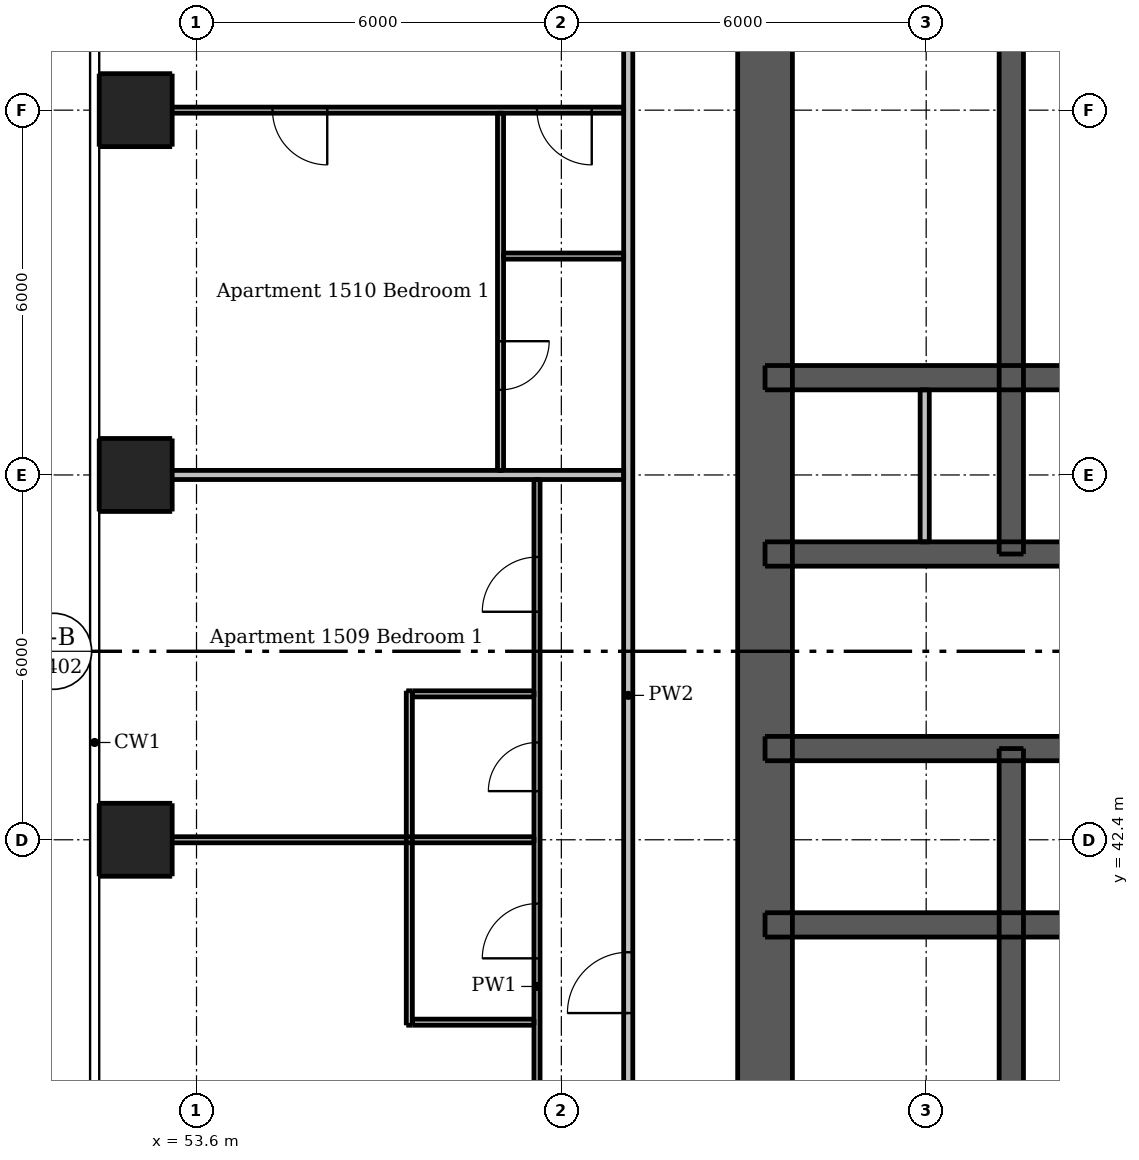
"""IFC4 building model, lengths in metres.
Left out: names, types, materials, properties, quantities, classifications, styles, units other than length and angle.
Written with IfcOpenShell. Run it as: python <this file> out.ifc"""

import sys

from ifc_helpers import new_model, si_unit, direction, frame, frame_2d, origin, origin_2d, place, context, subcontext, project, spatial, rectangle, extrude, element, fill, save


model = new_model("IFC4")
c1 = context("Model", 3, precision=1e-05, world=origin(), true_north=direction((0.0, 1.0)))
c2 = subcontext(c1, "Body", "Model", "MODEL_VIEW")
j1 = project(units=[si_unit("LENGTHUNIT", "METRE"), si_unit("PLANEANGLEUNIT", "RADIAN")], contexts=[c1])
p1 = place(None, origin())
s1 = spatial("IfcSite", under=j1, at=p1, CompositionType="ELEMENT")
p2 = place(p1, origin())
s2 = spatial("IfcBuilding", under=s1, at=p2, CompositionType="ELEMENT")
p3 = place(p2, frame((0.0, 0.0, 56.5)))
s3 = spatial("IfcBuildingStorey", under=s2, at=p3, CompositionType="ELEMENT", Elevation=56.5)
p4 = place(p3, frame((62.95, 33.5, 0.0), z_axis=(0.0, 0.0, 1.0), x_axis=(0.0, 1.0, 0.0)))
e1 = element("IfcWall", 1, at=p4, inside=s3, PredefinedType="SHEAR", context=c2, shape_type="SweptSolid", body=[
    extrude(rectangle(XDim=24.0, YDim=0.9, at=frame_2d((12.0, 0.0))), origin(), (0.0, 0.0, 1.0), 3.05),
])
p5 = place(p4, frame((11.2, 0.0, 0.0)))
e2 = element("IfcOpeningElement", 2, at=p5, cuts=e1, PredefinedType="OPENING", context=c2, shape_type="SweptSolid", body=[
    extrude(rectangle(XDim=1.6, YDim=2.1, at=frame_2d((0.8, 1.05))), frame((0.0, 0.46, 0.0), z_axis=(0.0, -1.0, 0.0), x_axis=(1.0, 0.0, 0.0)), (0.0, 0.0, 1.0), 0.92),
])
p6 = place(p3, frame((62.95, 41.0, 0.0), z_axis=(0.0, 0.0, 1.0), x_axis=(1.0, 0.0, 0.0)))
e3 = element("IfcWall", 3, at=p6, inside=s3, PredefinedType="SHEAR", context=c2, shape_type="SweptSolid", body=[
    extrude(rectangle(XDim=23.1, YDim=0.4, at=frame_2d((11.55, 0.0))), origin(), (0.0, 0.0, 1.0), 3.05),
])
p7 = place(p3, frame((62.95, 43.9, 0.0), z_axis=(0.0, 0.0, 1.0), x_axis=(1.0, 0.0, 0.0)))
e4 = element("IfcWall", 4, at=p7, inside=s3, PredefinedType="SHEAR", context=c2, shape_type="SweptSolid", body=[
    extrude(rectangle(XDim=23.1, YDim=0.4, at=frame_2d((11.55, 0.0))), origin(), (0.0, 0.0, 1.0), 3.05),
])
p8 = place(p7, frame((1.7, 0.0, 0.0)))
e5 = element("IfcOpeningElement", 5, at=p8, cuts=e4, PredefinedType="OPENING", context=c2, shape_type="SweptSolid", body=[
    extrude(rectangle(XDim=0.9, YDim=2.1, at=frame_2d((0.45, 1.05))), frame((0.0, 0.21, 0.0), z_axis=(0.0, -1.0, 0.0), x_axis=(1.0, 0.0, 0.0)), (0.0, 0.0, 1.0), 0.42),
])
p9 = place(p7, frame((20.5, 0.0, 0.0)))
e6 = element("IfcOpeningElement", 6, at=p9, cuts=e4, PredefinedType="OPENING", context=c2, shape_type="SweptSolid", body=[
    extrude(rectangle(XDim=0.9, YDim=2.1, at=frame_2d((0.45, 1.05))), frame((0.0, 0.21, 0.0), z_axis=(0.0, -1.0, 0.0), x_axis=(1.0, 0.0, 0.0)), (0.0, 0.0, 1.0), 0.42),
])
p10 = place(p7, frame((4.75, 0.0, 0.0)))
e7 = element("IfcOpeningElement", 7, at=p10, cuts=e4, PredefinedType="OPENING", context=c2, shape_type="SweptSolid", body=[
    extrude(rectangle(XDim=1.1, YDim=2.1, at=frame_2d((0.55, 1.05))), frame((0.0, 0.21, 0.0), z_axis=(0.0, -1.0, 0.0), x_axis=(1.0, 0.0, 0.0)), (0.0, 0.0, 1.0), 0.42),
])
p11 = place(p7, frame((7.25, 0.0, 0.0)))
e8 = element("IfcOpeningElement", 8, at=p11, cuts=e4, PredefinedType="OPENING", context=c2, shape_type="SweptSolid", body=[
    extrude(rectangle(XDim=1.1, YDim=2.1, at=frame_2d((0.55, 1.05))), frame((0.0, 0.21, 0.0), z_axis=(0.0, -1.0, 0.0), x_axis=(1.0, 0.0, 0.0)), (0.0, 0.0, 1.0), 0.42),
])
p12 = place(p7, frame((9.75, 0.0, 0.0)))
e9 = element("IfcOpeningElement", 9, at=p12, cuts=e4, PredefinedType="OPENING", context=c2, shape_type="SweptSolid", body=[
    extrude(rectangle(XDim=1.1, YDim=2.1, at=frame_2d((0.55, 1.05))), frame((0.0, 0.21, 0.0), z_axis=(0.0, -1.0, 0.0), x_axis=(1.0, 0.0, 0.0)), (0.0, 0.0, 1.0), 0.42),
])
p13 = place(p7, frame((12.25, 0.0, 0.0)))
e10 = element("IfcOpeningElement", 10, at=p13, cuts=e4, PredefinedType="OPENING", context=c2, shape_type="SweptSolid", body=[
    extrude(rectangle(XDim=1.1, YDim=2.1, at=frame_2d((0.55, 1.05))), frame((0.0, 0.21, 0.0), z_axis=(0.0, -1.0, 0.0), x_axis=(1.0, 0.0, 0.0)), (0.0, 0.0, 1.0), 0.42),
])
p14 = place(p7, frame((14.75, 0.0, 0.0)))
e11 = element("IfcOpeningElement", 11, at=p14, cuts=e4, PredefinedType="OPENING", context=c2, shape_type="SweptSolid", body=[
    extrude(rectangle(XDim=1.1, YDim=2.1, at=frame_2d((0.55, 1.05))), frame((0.0, 0.21, 0.0), z_axis=(0.0, -1.0, 0.0), x_axis=(1.0, 0.0, 0.0)), (0.0, 0.0, 1.0), 0.42),
])
p15 = place(p7, frame((17.25, 0.0, 0.0)))
e12 = element("IfcOpeningElement", 12, at=p15, cuts=e4, PredefinedType="OPENING", context=c2, shape_type="SweptSolid", body=[
    extrude(rectangle(XDim=1.1, YDim=2.1, at=frame_2d((0.55, 1.05))), frame((0.0, 0.21, 0.0), z_axis=(0.0, -1.0, 0.0), x_axis=(1.0, 0.0, 0.0)), (0.0, 0.0, 1.0), 0.42),
])
p16 = place(p3, frame((62.95, 47.1, 0.0), z_axis=(0.0, 0.0, 1.0), x_axis=(1.0, 0.0, 0.0)))
e13 = element("IfcWall", 13, at=p16, inside=s3, PredefinedType="SHEAR", context=c2, shape_type="SweptSolid", body=[
    extrude(rectangle(XDim=23.1, YDim=0.4, at=frame_2d((11.55, 0.0))), origin(), (0.0, 0.0, 1.0), 3.05),
])
p17 = place(p16, frame((1.088, 0.0, 0.0)))
e14 = element("IfcOpeningElement", 14, at=p17, cuts=e13, PredefinedType="OPENING", context=c2, shape_type="SweptSolid", body=[
    extrude(rectangle(XDim=0.9, YDim=2.1, at=frame_2d((0.45, 1.05))), frame((0.0, 0.21, 0.0), z_axis=(0.0, -1.0, 0.0), x_axis=(1.0, 0.0, 0.0)), (0.0, 0.0, 1.0), 0.42),
])
p18 = place(p16, frame((2.838, 0.0, 0.0)))
e15 = element("IfcOpeningElement", 15, at=p18, cuts=e13, PredefinedType="OPENING", context=c2, shape_type="SweptSolid", body=[
    extrude(rectangle(XDim=0.8, YDim=2.1, at=frame_2d((0.4, 1.05))), frame((0.0, 0.21, 0.0), z_axis=(0.0, -1.0, 0.0), x_axis=(1.0, 0.0, 0.0)), (0.0, 0.0, 1.0), 0.42),
])
p19 = place(p16, frame((20.5, 0.0, 0.0)))
e16 = element("IfcOpeningElement", 16, at=p19, cuts=e13, PredefinedType="OPENING", context=c2, shape_type="SweptSolid", body=[
    extrude(rectangle(XDim=0.9, YDim=2.1, at=frame_2d((0.45, 1.05))), frame((0.0, 0.21, 0.0), z_axis=(0.0, -1.0, 0.0), x_axis=(1.0, 0.0, 0.0)), (0.0, 0.0, 1.0), 0.42),
])
p20 = place(p3, frame((62.95, 50.0, 0.0), z_axis=(0.0, 0.0, 1.0), x_axis=(1.0, 0.0, 0.0)))
e17 = element("IfcWall", 17, at=p20, inside=s3, PredefinedType="SHEAR", context=c2, shape_type="SweptSolid", body=[
    extrude(rectangle(XDim=23.1, YDim=0.4, at=frame_2d((11.55, 0.0))), origin(), (0.0, 0.0, 1.0), 3.05),
])
p21 = place(p3, frame((67.0, 33.95, 0.0), z_axis=(0.0, 0.0, 1.0), x_axis=(0.0, 1.0, 0.0)))
e18 = element("IfcWall", 18, at=p21, inside=s3, PredefinedType="SHEAR", context=c2, shape_type="SweptSolid", body=[
    extrude(rectangle(XDim=9.95, YDim=0.4, at=frame_2d((4.975, 0.0))), origin(), (0.0, 0.0, 1.0), 3.05),
])
p22 = place(p21, frame((0.65, 0.0, 0.0)))
e19 = element("IfcOpeningElement", 19, at=p22, cuts=e18, PredefinedType="OPENING", context=c2, shape_type="SweptSolid", body=[
    extrude(rectangle(XDim=1.1, YDim=2.1, at=frame_2d((0.55, 1.05))), frame((0.0, 0.21, 0.0), z_axis=(0.0, -1.0, 0.0), x_axis=(1.0, 0.0, 0.0)), (0.0, 0.0, 1.0), 0.42),
])
p23 = place(p3, frame((67.0, 47.1, 0.0), z_axis=(0.0, 0.0, 1.0), x_axis=(0.0, 1.0, 0.0)))
e20 = element("IfcWall", 20, at=p23, inside=s3, PredefinedType="SHEAR", context=c2, shape_type="SweptSolid", body=[
    extrude(rectangle(XDim=9.95, YDim=0.4, at=frame_2d((4.975, 0.0))), origin(), (0.0, 0.0, 1.0), 3.05),
])
for number, where, z_axis, x_axis in (
    (21, (52.6, 42.4, 0.0), (0.0, 0.0, 1.0), (1.0, 0.0, 0.0)),
    (22, (52.6, 48.4, 0.0), (0.0, 0.0, 1.0), (1.0, 0.0, 0.0)),
    (23, (52.6, 54.4, 0.0), (0.0, 0.0, 1.0), (1.0, 0.0, 0.0)),
):
    element("IfcColumn", number, at=place(p3, frame(where, z_axis=z_axis, x_axis=x_axis)), inside=s3, PredefinedType="COLUMN", context=c2, shape_type="SweptSolid", body=[
        extrude(rectangle(XDim=1.2, YDim=1.2, at=origin_2d()), origin(), (0.0, 0.0, 1.0), 3.05),
    ])
p24 = place(p3, frame((65.576, 47.3, 0.0), z_axis=(0.0, 0.0, 1.0), x_axis=(0.0, 1.0, 0.0)))
e24 = element("IfcWall", 24, at=p24, inside=s3, PredefinedType="PLUMBINGWALL", context=c2, shape_type="SweptSolid", body=[
    extrude(rectangle(XDim=2.5, YDim=0.15, at=frame_2d((1.25, 0.0))), origin(), (0.0, 0.0, 1.0), 3.05),
])
p25 = place(p3, frame((57.1, 39.35, 0.0), z_axis=(0.0, 0.0, 1.0), x_axis=(0.0, 1.0, 0.0)))
e25 = element("IfcWall", 25, at=p25, inside=s3, PredefinedType="PARTITIONING", context=c2, shape_type="SweptSolid", body=[
    extrude(rectangle(XDim=5.5, YDim=0.1, at=frame_2d((2.75, 0.0))), origin(), (0.0, 0.0, 1.0), 3.05),
])
p26 = place(p3, frame((58.6, 54.35, 0.0), z_axis=(0.0, 0.0, 1.0), x_axis=(0.0, -1.0, 0.0)))
e26 = element("IfcWall", 26, at=p26, inside=s3, PredefinedType="PARTITIONING", context=c2, shape_type="SweptSolid", body=[
    extrude(rectangle(XDim=5.875, YDim=0.1, at=frame_2d((2.938, 0.0))), origin(), (0.0, 0.0, 1.0), 3.05),
])
p27 = place(p26, frame((3.75, 0.0, 0.0)))
e27 = element("IfcOpeningElement", 27, at=p27, cuts=e26, PredefinedType="OPENING", context=c2, shape_type="SweptSolid", body=[
    extrude(rectangle(XDim=0.8, YDim=2.1, at=frame_2d((0.4, 1.05))), frame((0.0, 0.06, 0.0), z_axis=(0.0, -1.0, 0.0), x_axis=(1.0, 0.0, 0.0)), (0.0, 0.0, 1.0), 0.12),
])
p28 = place(p3, frame((59.2, 31.65, 0.0), z_axis=(0.0, 0.0, 1.0), x_axis=(0.0, 1.0, 0.0)))
e28 = element("IfcWall", 28, at=p28, inside=s3, PredefinedType="PARTITIONING", context=c2, shape_type="SweptSolid", body=[
    extrude(rectangle(XDim=16.675, YDim=0.1, at=frame_2d((8.337, 0.0))), origin(), (0.0, 0.0, 1.0), 3.05),
])
p29 = place(p28, frame((3.45, 0.0, 0.0)))
e29 = element("IfcOpeningElement", 29, at=p29, cuts=e28, PredefinedType="OPENING", context=c2, shape_type="SweptSolid", body=[
    extrude(rectangle(XDim=0.9, YDim=2.1, at=frame_2d((0.45, 1.05))), frame((0.0, 0.06, 0.0), z_axis=(0.0, -1.0, 0.0), x_axis=(1.0, 0.0, 0.0)), (0.0, 0.0, 1.0), 0.12),
])
p30 = place(p28, frame((8.8, 0.0, 0.0)))
e30 = element("IfcOpeningElement", 30, at=p30, cuts=e28, PredefinedType="OPENING", context=c2, shape_type="SweptSolid", body=[
    extrude(rectangle(XDim=0.9, YDim=2.1, at=frame_2d((0.45, 1.05))), frame((0.0, 0.06, 0.0), z_axis=(0.0, -1.0, 0.0), x_axis=(1.0, 0.0, 0.0)), (0.0, 0.0, 1.0), 0.12),
])
p31 = place(p28, frame((14.5, 0.0, 0.0)))
e31 = element("IfcOpeningElement", 31, at=p31, cuts=e28, PredefinedType="OPENING", context=c2, shape_type="SweptSolid", body=[
    extrude(rectangle(XDim=0.9, YDim=2.1, at=frame_2d((0.45, 1.05))), frame((0.0, 0.06, 0.0), z_axis=(0.0, -1.0, 0.0), x_axis=(1.0, 0.0, 0.0)), (0.0, 0.0, 1.0), 0.12),
])
p32 = place(p28, frame((11.55, 0.0, 0.0)))
e32 = element("IfcOpeningElement", 32, at=p32, cuts=e28, PredefinedType="OPENING", context=c2, shape_type="SweptSolid", body=[
    extrude(rectangle(XDim=0.8, YDim=2.1, at=frame_2d((0.4, 1.05))), frame((0.0, 0.06, 0.0), z_axis=(0.0, -1.0, 0.0), x_axis=(1.0, 0.0, 0.0)), (0.0, 0.0, 1.0), 0.12),
])
p33 = place(p3, frame((60.625, 54.4, 0.0), z_axis=(0.0, 0.0, 1.0), x_axis=(-1.0, 0.0, 0.0)))
e33 = element("IfcWall", 33, at=p33, inside=s3, PredefinedType="PARTITIONING", context=c2, shape_type="SweptSolid", body=[
    extrude(rectangle(XDim=8.625, YDim=0.1, at=frame_2d((4.312, 0.0))), origin(), (0.0, 0.0, 1.0), 2.516),
])
p34 = place(p33, frame((0.525, 0.0, 0.0)))
e34 = element("IfcOpeningElement", 34, at=p34, cuts=e33, PredefinedType="OPENING", context=c2, shape_type="SweptSolid", body=[
    extrude(rectangle(XDim=0.9, YDim=2.1, at=frame_2d((0.45, 1.05))), frame((0.0, 0.06, 0.0), z_axis=(0.0, -1.0, 0.0), x_axis=(1.0, 0.0, 0.0)), (0.0, 0.0, 1.0), 0.12),
])
p35 = place(p33, frame((4.875, 0.0, 0.0)))
e35 = element("IfcOpeningElement", 35, at=p35, cuts=e33, PredefinedType="OPENING", context=c2, shape_type="SweptSolid", body=[
    extrude(rectangle(XDim=0.9, YDim=2.1, at=frame_2d((0.45, 1.05))), frame((0.0, 0.06, 0.0), z_axis=(0.0, -1.0, 0.0), x_axis=(1.0, 0.0, 0.0)), (0.0, 0.0, 1.0), 0.12),
])
p36 = place(p3, frame((58.65, 52.0, 0.0), z_axis=(0.0, 0.0, 1.0), x_axis=(1.0, 0.0, 0.0)))
e36 = element("IfcWall", 36, at=p36, inside=s3, PredefinedType="PARTITIONING", context=c2, shape_type="SweptSolid", body=[
    extrude(rectangle(XDim=1.975, YDim=0.1, at=frame_2d((0.988, 0.0))), origin(), (0.0, 0.0, 1.0), 3.05),
])
p37 = place(p3, frame((57.15, 44.8, 0.0), z_axis=(0.0, 0.0, 1.0), x_axis=(1.0, 0.0, 0.0)))
e37 = element("IfcWall", 37, at=p37, inside=s3, PredefinedType="PARTITIONING", context=c2, shape_type="SweptSolid", body=[
    extrude(rectangle(XDim=2.0, YDim=0.1, at=frame_2d((1.0, 0.0))), origin(), (0.0, 0.0, 1.0), 3.05),
])
p38 = place(p3, frame((52.0, 42.4, 0.0), z_axis=(0.0, 0.0, 1.0), x_axis=(1.0, 0.0, 0.0)))
e38 = element("IfcWall", 38, at=p38, inside=s3, PredefinedType="PARTITIONING", context=c2, shape_type="SweptSolid", body=[
    extrude(rectangle(XDim=7.15, YDim=0.1, at=frame_2d((3.575, 0.0))), origin(), (0.0, 0.0, 1.0), 2.516),
])
p39 = place(p3, frame((57.15, 39.4, 0.0), z_axis=(0.0, 0.0, 1.0), x_axis=(1.0, 0.0, 0.0)))
e39 = element("IfcWall", 39, at=p39, inside=s3, PredefinedType="PARTITIONING", context=c2, shape_type="SweptSolid", body=[
    extrude(rectangle(XDim=2.0, YDim=0.1, at=frame_2d((1.0, 0.0))), origin(), (0.0, 0.0, 1.0), 3.05),
])
p40 = place(p3, frame((60.7, 30.325, 0.0), z_axis=(0.0, 0.0, 1.0), x_axis=(0.0, 1.0, 0.0)))
e40 = element("IfcWall", 40, at=p40, inside=s3, PredefinedType="PARTITIONING", context=c2, shape_type="SweptSolid", body=[
    extrude(rectangle(XDim=28.9, YDim=0.15, at=frame_2d((14.45, 0.0))), origin(), (0.0, 0.0, 1.0), 3.05),
])
p41 = place(p40, frame((9.225, 0.0, 0.0)))
e41 = element("IfcOpeningElement", 41, at=p41, cuts=e40, PredefinedType="OPENING", context=c2, shape_type="SweptSolid", body=[
    extrude(rectangle(XDim=1.0, YDim=2.1, at=frame_2d((0.5, 1.05))), frame((0.0, 0.085, 0.0), z_axis=(0.0, -1.0, 0.0), x_axis=(1.0, 0.0, 0.0)), (0.0, 0.0, 1.0), 0.17),
])
p42 = place(p40, frame((26.025, 0.0, 0.0)))
e42 = element("IfcOpeningElement", 42, at=p42, cuts=e40, PredefinedType="OPENING", context=c2, shape_type="SweptSolid", body=[
    extrude(rectangle(XDim=1.0, YDim=2.1, at=frame_2d((0.5, 1.05))), frame((0.0, 0.085, 0.0), z_axis=(0.0, -1.0, 0.0), x_axis=(1.0, 0.0, 0.0)), (0.0, 0.0, 1.0), 0.17),
])
p43 = place(p3, frame((52.0, 48.4, 0.0), z_axis=(0.0, 0.0, 1.0), x_axis=(1.0, 0.0, 0.0)))
e43 = element("IfcWall", 43, at=p43, inside=s3, PredefinedType="PARTITIONING", context=c2, shape_type="SweptSolid", body=[
    extrude(rectangle(XDim=8.625, YDim=0.15, at=frame_2d((4.312, 0.0))), origin(), (0.0, 0.0, 1.0), 2.516),
])
p44 = place(p5, origin())
e44 = element("IfcDoor", 44, at=p44, inside=s3, OperationType="DOUBLE_DOOR_SINGLE_SWING", PredefinedType="DOOR", context=c2, shape_type="SweptSolid", body=[
    extrude(rectangle(XDim=1.6, YDim=2.1, at=frame_2d((0.8, 1.05))), frame((0.0, -0.388, 0.0), z_axis=(0.0, -1.0, 0.0), x_axis=(1.0, 0.0, 0.0)), (0.0, 0.0, 1.0), 0.05),
])
fill(e2, e44)
p45 = place(p8, origin())
e45 = element("IfcDoor", 45, at=p45, inside=s3, OperationType="SINGLE_SWING_LEFT", PredefinedType="DOOR", context=c2, shape_type="SweptSolid", body=[
    extrude(rectangle(XDim=0.9, YDim=2.1, at=frame_2d((0.45, 1.05))), frame((0.0, -0.138, 0.0), z_axis=(0.0, -1.0, 0.0), x_axis=(1.0, 0.0, 0.0)), (0.0, 0.0, 1.0), 0.05),
])
fill(e5, e45)
p46 = place(p17, origin())
e46 = element("IfcDoor", 46, at=p46, inside=s3, OperationType="SINGLE_SWING_LEFT", PredefinedType="DOOR", context=c2, shape_type="SweptSolid", body=[
    extrude(rectangle(XDim=0.9, YDim=2.1, at=frame_2d((0.45, 1.05))), frame((0.0, 0.188, 0.0), z_axis=(0.0, -1.0, 0.0), x_axis=(1.0, 0.0, 0.0)), (0.0, 0.0, 1.0), 0.05),
])
fill(e14, e46)
p47 = place(p18, origin())
e47 = element("IfcDoor", 47, at=p47, inside=s3, OperationType="SINGLE_SWING_RIGHT", PredefinedType="DOOR", context=c2, shape_type="SweptSolid", body=[
    extrude(rectangle(XDim=0.8, YDim=2.1, at=frame_2d((0.4, 1.05))), frame((0.0, 0.188, 0.0), z_axis=(0.0, -1.0, 0.0), x_axis=(1.0, 0.0, 0.0)), (0.0, 0.0, 1.0), 0.05),
])
fill(e15, e47)
p48 = place(p10, origin())
e48 = element("IfcDoor", 48, at=p48, inside=s3, OperationType="DOUBLE_DOOR_SLIDING", PredefinedType="DOOR", context=c2, shape_type="SweptSolid", body=[
    extrude(rectangle(XDim=1.1, YDim=2.1, at=frame_2d((0.55, 1.05))), frame((0.0, 0.025, 0.0), z_axis=(0.0, -1.0, 0.0), x_axis=(1.0, 0.0, 0.0)), (0.0, 0.0, 1.0), 0.05),
])
fill(e7, e48)
p49 = place(p41, origin())
e49 = element("IfcDoor", 49, at=p49, inside=s3, OperationType="SINGLE_SWING_LEFT", PredefinedType="DOOR", context=c2, shape_type="SweptSolid", body=[
    extrude(rectangle(XDim=1.0, YDim=2.1, at=frame_2d((0.5, 1.05))), frame((0.0, 0.025, 0.0), z_axis=(0.0, -1.0, 0.0), x_axis=(1.0, 0.0, 0.0)), (0.0, 0.0, 1.0), 0.05),
])
fill(e41, e49)
p50 = place(p30, origin())
e50 = element("IfcDoor", 50, at=p50, inside=s3, OperationType="SINGLE_SWING_LEFT", PredefinedType="DOOR", context=c2, shape_type="SweptSolid", body=[
    extrude(rectangle(XDim=0.9, YDim=2.1, at=frame_2d((0.45, 1.05))), frame((0.0, 0.025, 0.0), z_axis=(0.0, -1.0, 0.0), x_axis=(1.0, 0.0, 0.0)), (0.0, 0.0, 1.0), 0.05),
])
fill(e30, e50)
p51 = place(p31, origin())
e51 = element("IfcDoor", 51, at=p51, inside=s3, OperationType="SINGLE_SWING_LEFT", PredefinedType="DOOR", context=c2, shape_type="SweptSolid", body=[
    extrude(rectangle(XDim=0.9, YDim=2.1, at=frame_2d((0.45, 1.05))), frame((0.0, 0.025, 0.0), z_axis=(0.0, -1.0, 0.0), x_axis=(1.0, 0.0, 0.0)), (0.0, 0.0, 1.0), 0.05),
])
fill(e31, e51)
p52 = place(p32, origin())
e52 = element("IfcDoor", 52, at=p52, inside=s3, OperationType="SINGLE_SWING_LEFT", PredefinedType="DOOR", context=c2, shape_type="SweptSolid", body=[
    extrude(rectangle(XDim=0.8, YDim=2.1, at=frame_2d((0.4, 1.05))), frame((0.0, 0.025, 0.0), z_axis=(0.0, -1.0, 0.0), x_axis=(1.0, 0.0, 0.0)), (0.0, 0.0, 1.0), 0.05),
])
fill(e32, e52)
p53 = place(p34, origin())
e53 = element("IfcDoor", 53, at=p53, inside=s3, OperationType="SINGLE_SWING_LEFT", PredefinedType="DOOR", context=c2, shape_type="SweptSolid", body=[
    extrude(rectangle(XDim=0.9, YDim=2.1, at=frame_2d((0.45, 1.05))), frame((0.0, 0.025, 0.0), z_axis=(0.0, -1.0, 0.0), x_axis=(1.0, 0.0, 0.0)), (0.0, 0.0, 1.0), 0.05),
])
fill(e34, e53)
p54 = place(p35, origin())
e54 = element("IfcDoor", 54, at=p54, inside=s3, OperationType="SINGLE_SWING_LEFT", PredefinedType="DOOR", context=c2, shape_type="SweptSolid", body=[
    extrude(rectangle(XDim=0.9, YDim=2.1, at=frame_2d((0.45, 1.05))), frame((0.0, 0.025, 0.0), z_axis=(0.0, -1.0, 0.0), x_axis=(1.0, 0.0, 0.0)), (0.0, 0.0, 1.0), 0.05),
])
fill(e35, e54)
p55 = place(p27, origin())
e55 = element("IfcDoor", 55, at=p55, inside=s3, OperationType="SINGLE_SWING_LEFT", PredefinedType="DOOR", context=c2, shape_type="SweptSolid", body=[
    extrude(rectangle(XDim=0.8, YDim=2.1, at=frame_2d((0.4, 1.05))), frame((0.0, 0.025, 0.0), z_axis=(0.0, -1.0, 0.0), x_axis=(1.0, 0.0, 0.0)), (0.0, 0.0, 1.0), 0.05),
])
fill(e27, e55)
save(model, sys.argv[1])
